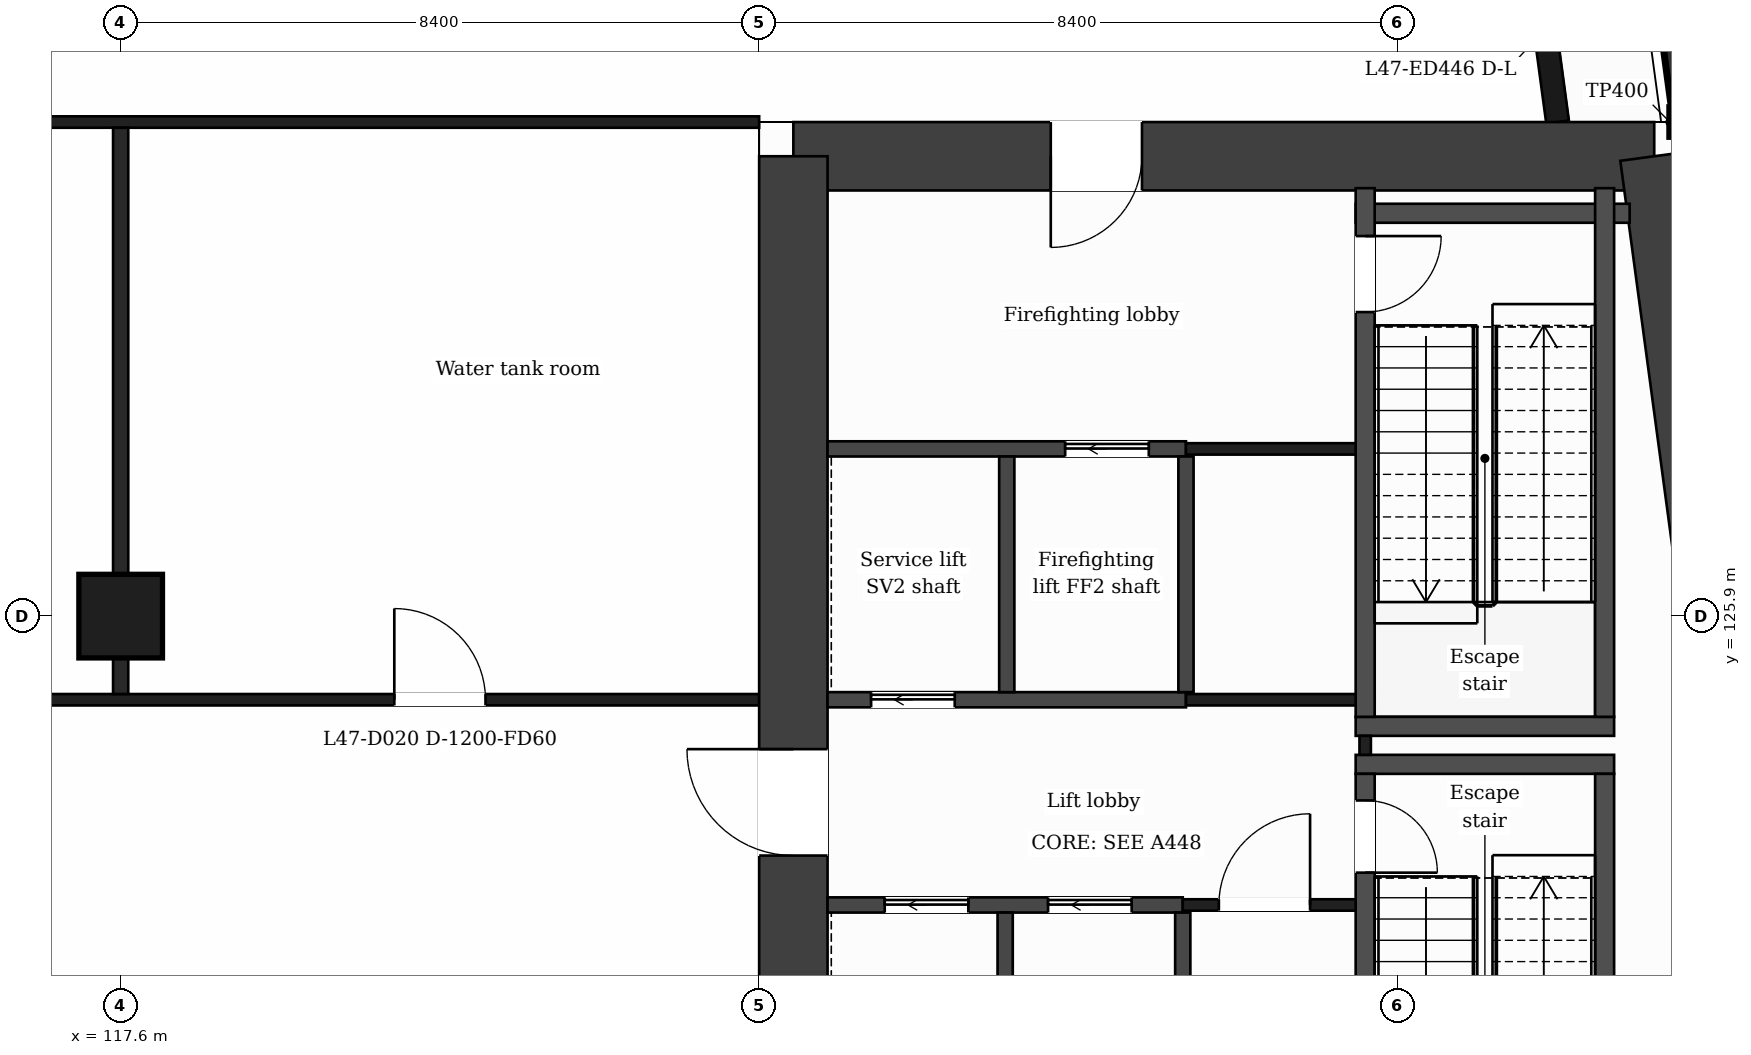
"""IFC4 building model, lengths in metres.
Left out: names, types, materials, properties, quantities, classifications, styles, units other than length and angle.
Written with IfcOpenShell. Run it as: python <this file> out.ifc"""

import sys

from ifc_helpers import new_model, si_unit, direction, frame, frame_2d, origin, origin_2d, place, context, subcontext, project, spatial, rectangle, extrude, element, fill, save


model = new_model("IFC4")
c1 = context("Model", 3, precision=1e-05, world=origin(), true_north=direction((0.0, 1.0)))
c2 = subcontext(c1, "Body", "Model", "MODEL_VIEW")
j1 = project(units=[si_unit("LENGTHUNIT", "METRE"), si_unit("PLANEANGLEUNIT", "RADIAN")], contexts=[c1])
p1 = place(None, origin())
s1 = spatial("IfcSite", under=j1, at=p1, CompositionType="ELEMENT")
p2 = place(p1, origin())
s2 = spatial("IfcBuilding", under=s1, at=p2, CompositionType="ELEMENT")
p3 = place(p2, frame((0.0, 0.0, 197.2)))
s3 = spatial("IfcBuildingStorey", under=s2, at=p3, CompositionType="ELEMENT", Elevation=197.2)
p4 = place(p3, frame((126.45, 131.95, 0.0), z_axis=(0.0, 0.0, 1.0), x_axis=(1.0, 0.0, 0.0)))
e1 = element("IfcWall", 1, at=p4, inside=s3, PredefinedType="SHEAR", context=c2, shape_type="SweptSolid", body=[
    extrude(rectangle(XDim=11.326, YDim=0.9, at=frame_2d((5.663, 0.0))), origin(), (0.0, 0.0, 1.0), 5.0),
])
p5 = place(p4, frame((3.386, 0.0, 0.0)))
e2 = element("IfcOpeningElement", 2, at=p5, cuts=e1, PredefinedType="OPENING", context=c2, shape_type="SweptSolid", body=[
    extrude(rectangle(XDim=1.2, YDim=2.1, at=frame_2d((0.6, 1.05))), frame((0.0, 0.46, 0.0), z_axis=(0.0, -1.0, 0.0), x_axis=(1.0, 0.0, 0.0)), (0.0, 0.0, 1.0), 0.92),
])
p6 = place(p3, frame((137.776, 131.95, 0.0), z_axis=(0.0, 0.0, 1.0), x_axis=(0.133421759112, -0.991059349482, 0.0)))
e3 = element("IfcWall", 3, at=p6, inside=s3, PredefinedType="SHEAR", context=c2, shape_type="SweptSolid", body=[
    extrude(rectangle(XDim=21.29, YDim=0.9, at=frame_2d((10.645, 0.0))), origin(), (0.0, 0.0, 1.0), 5.0),
])
p7 = place(p3, frame((126.45, 110.85, 0.0), z_axis=(0.0, 0.0, 1.0), x_axis=(0.0, 1.0, 0.0)))
e4 = element("IfcWall", 4, at=p7, inside=s3, PredefinedType="SHEAR", context=c2, shape_type="SweptSolid", body=[
    extrude(rectangle(XDim=21.1, YDim=0.9, at=frame_2d((10.55, 0.0))), origin(), (0.0, 0.0, 1.0), 5.0),
])
p8 = place(p7, frame((1.05, 0.0, 0.0)))
e5 = element("IfcOpeningElement", 5, at=p8, cuts=e4, PredefinedType="OPENING", context=c2, shape_type="SweptSolid", body=[
    extrude(rectangle(XDim=1.2, YDim=2.1, at=frame_2d((0.6, 1.05))), frame((0.0, 0.46, 0.0), z_axis=(0.0, -1.0, 0.0), x_axis=(1.0, 0.0, 0.0)), (0.0, 0.0, 1.0), 0.92),
])
p9 = place(p7, frame((11.9, 0.0, 0.0)))
e6 = element("IfcOpeningElement", 6, at=p9, cuts=e4, PredefinedType="OPENING", context=c2, shape_type="SweptSolid", body=[
    extrude(rectangle(XDim=1.4, YDim=2.1, at=frame_2d((0.7, 1.05))), frame((0.0, 0.46, 0.0), z_axis=(0.0, -1.0, 0.0), x_axis=(1.0, 0.0, 0.0)), (0.0, 0.0, 1.0), 0.92),
])
p10 = place(p3, frame((117.6, 125.9, 0.0), z_axis=(0.0, 0.0, 1.0), x_axis=(1.0, 0.0, 0.0)))
e7 = element("IfcColumn", 7, at=p10, inside=s3, PredefinedType="COLUMN", context=c2, shape_type="SweptSolid", body=[
    extrude(rectangle(XDim=1.1, YDim=1.1, at=origin_2d()), origin(), (0.0, 0.0, 1.0), 5.0),
])
p11 = place(p3, frame((136.504, 132.4, 0.0), z_axis=(0.0, 0.0, 1.0), x_axis=(-0.133399697462, 0.99106231929, 0.0)))
e8 = element("IfcWall", 8, at=p11, inside=s3, PredefinedType="SOLIDWALL", context=c2, shape_type="SweptSolid", body=[
    extrude(rectangle(XDim=6.74, YDim=0.3, at=frame_2d((3.37, 0.0))), origin(), (0.0, 0.0, 1.0), 4.68),
])
p12 = place(p11, frame((1.115, 0.0, 0.0)))
e9 = element("IfcOpeningElement", 9, at=p12, cuts=e8, PredefinedType="OPENING", context=c2, shape_type="SweptSolid", body=[
    extrude(rectangle(XDim=1.2, YDim=2.4, at=frame_2d((0.6, 1.2))), frame((0.0, 0.16, 0.0), z_axis=(0.0, -1.0, 0.0), x_axis=(1.0, 0.0, 0.0)), (0.0, 0.0, 1.0), 0.32),
])
p13 = place(p3, frame((126.9, 122.1, 0.0), z_axis=(0.0, 0.0, 1.0), x_axis=(1.0, 0.0, 0.0)))
e10 = element("IfcWall", 10, at=p13, inside=s3, PredefinedType="PARTITIONING", context=c2, shape_type="SweptSolid", body=[
    extrude(rectangle(XDim=4.673, YDim=0.2, at=frame_2d((2.336, 0.0))), origin(), (0.0, 0.0, 1.0), 4.68),
])
p14 = place(p13, frame((2.901, 0.0, 0.0)))
e11 = element("IfcOpeningElement", 11, at=p14, cuts=e10, PredefinedType="OPENING", context=c2, shape_type="SweptSolid", body=[
    extrude(rectangle(XDim=1.1, YDim=2.1, at=frame_2d((0.55, 1.05))), frame((0.0, 0.11, 0.0), z_axis=(0.0, -1.0, 0.0), x_axis=(1.0, 0.0, 0.0)), (0.0, 0.0, 1.0), 0.22),
])
p15 = place(p13, frame((0.752, 0.0, 0.0)))
e12 = element("IfcOpeningElement", 12, at=p15, cuts=e10, PredefinedType="OPENING", context=c2, shape_type="SweptSolid", body=[
    extrude(rectangle(XDim=1.1, YDim=2.1, at=frame_2d((0.55, 1.05))), frame((0.0, 0.11, 0.0), z_axis=(0.0, -1.0, 0.0), x_axis=(1.0, 0.0, 0.0)), (0.0, 0.0, 1.0), 0.22),
])
p16 = place(p3, frame((131.573, 122.1, 0.0), z_axis=(0.0, 0.0, 1.0), x_axis=(1.0, 0.0, 0.0)))
e13 = element("IfcWall", 13, at=p16, inside=s3, PredefinedType="PARTITIONING", context=c2, shape_type="SweptSolid", body=[
    extrude(rectangle(XDim=2.4, YDim=0.15, at=frame_2d((1.2, 0.0))), origin(), (0.0, 0.0, 1.0), 4.68),
])
p17 = place(p16, frame((0.475, 0.0, 0.0)))
e14 = element("IfcOpeningElement", 14, at=p17, cuts=e13, PredefinedType="OPENING", context=c2, shape_type="SweptSolid", body=[
    extrude(rectangle(XDim=1.2, YDim=2.1, at=frame_2d((0.6, 1.05))), frame((0.0, 0.085, 0.0), z_axis=(0.0, -1.0, 0.0), x_axis=(1.0, 0.0, 0.0)), (0.0, 0.0, 1.0), 0.17),
])
for number, where, z_axis, x_axis in (
    (15, (133.848, 123.95, 0.0), (0.0, 0.0, 1.0), (1.0, 0.0, 0.0)),
    (16, (133.848, 124.45, 0.0), (0.0, 0.0, 1.0), (1.0, 0.0, 0.0)),
):
    element("IfcWall", number, at=place(p3, frame(where, z_axis=z_axis, x_axis=x_axis)), inside=s3, PredefinedType="PARTITIONING", context=c2, shape_type="SweptSolid", body=[
        extrude(rectangle(XDim=3.4, YDim=0.25, at=frame_2d((1.7, 0.0))), origin(), (0.0, 0.0, 1.0), 4.68),
    ])
p18 = place(p3, frame((126.9, 124.8, 0.0), z_axis=(0.0, 0.0, 1.0), x_axis=(1.0, 0.0, 0.0)))
e17 = element("IfcWall", 17, at=p18, inside=s3, PredefinedType="PARTITIONING", context=c2, shape_type="SweptSolid", body=[
    extrude(rectangle(XDim=4.715, YDim=0.2, at=frame_2d((2.358, 0.0))), origin(), (0.0, 0.0, 1.0), 4.68),
])
p19 = place(p18, frame((0.573, 0.0, 0.0)))
e18 = element("IfcOpeningElement", 18, at=p19, cuts=e17, PredefinedType="OPENING", context=c2, shape_type="SweptSolid", body=[
    extrude(rectangle(XDim=1.1, YDim=2.1, at=frame_2d((0.55, 1.05))), frame((0.0, 0.11, 0.0), z_axis=(0.0, -1.0, 0.0), x_axis=(1.0, 0.0, 0.0)), (0.0, 0.0, 1.0), 0.22),
])
p20 = place(p3, frame((131.615, 124.8, 0.0), z_axis=(0.0, 0.0, 1.0), x_axis=(1.0, 0.0, 0.0)))
e19 = element("IfcWall", 19, at=p20, inside=s3, PredefinedType="PARTITIONING", context=c2, shape_type="SweptSolid", body=[
    extrude(rectangle(XDim=2.483, YDim=0.15, at=frame_2d((1.241, 0.0))), origin(), (0.0, 0.0, 1.0), 4.68),
])
p21 = place(p3, frame((100.8, 124.8, 0.0), z_axis=(0.0, 0.0, 1.0), x_axis=(1.0, 0.0, 0.0)))
e20 = element("IfcWall", 20, at=p21, inside=s3, PredefinedType="PARTITIONING", context=c2, shape_type="SweptSolid", body=[
    extrude(rectangle(XDim=25.2, YDim=0.15, at=frame_2d((12.6, 0.0))), origin(), (0.0, 0.0, 1.0), 4.68),
])
p22 = place(p21, frame((3.6, 0.0, 0.0)))
e21 = element("IfcOpeningElement", 21, at=p22, cuts=e20, PredefinedType="OPENING", context=c2, shape_type="SweptSolid", body=[
    extrude(rectangle(XDim=1.2, YDim=2.1, at=frame_2d((0.6, 1.05))), frame((0.0, 0.085, 0.0), z_axis=(0.0, -1.0, 0.0), x_axis=(1.0, 0.0, 0.0)), (0.0, 0.0, 1.0), 0.17),
])
p23 = place(p21, frame((12.0, 0.0, 0.0)))
e22 = element("IfcOpeningElement", 22, at=p23, cuts=e20, PredefinedType="OPENING", context=c2, shape_type="SweptSolid", body=[
    extrude(rectangle(XDim=1.2, YDim=2.1, at=frame_2d((0.6, 1.05))), frame((0.0, 0.085, 0.0), z_axis=(0.0, -1.0, 0.0), x_axis=(1.0, 0.0, 0.0)), (0.0, 0.0, 1.0), 0.17),
])
p24 = place(p21, frame((20.4, 0.0, 0.0)))
e23 = element("IfcOpeningElement", 23, at=p24, cuts=e20, PredefinedType="OPENING", context=c2, shape_type="SweptSolid", body=[
    extrude(rectangle(XDim=1.2, YDim=2.1, at=frame_2d((0.6, 1.05))), frame((0.0, 0.085, 0.0), z_axis=(0.0, -1.0, 0.0), x_axis=(1.0, 0.0, 0.0)), (0.0, 0.0, 1.0), 0.17),
])
p25 = place(p3, frame((126.9, 128.1, 0.0), z_axis=(0.0, 0.0, 1.0), x_axis=(1.0, 0.0, 0.0)))
e24 = element("IfcWall", 24, at=p25, inside=s3, PredefinedType="PARTITIONING", context=c2, shape_type="SweptSolid", body=[
    extrude(rectangle(XDim=4.715, YDim=0.2, at=frame_2d((2.358, 0.0))), origin(), (0.0, 0.0, 1.0), 4.68),
])
p26 = place(p25, frame((3.126, 0.0, 0.0)))
e25 = element("IfcOpeningElement", 25, at=p26, cuts=e24, PredefinedType="OPENING", context=c2, shape_type="SweptSolid", body=[
    extrude(rectangle(XDim=1.1, YDim=2.1, at=frame_2d((0.55, 1.05))), frame((0.0, 0.11, 0.0), z_axis=(0.0, -1.0, 0.0), x_axis=(1.0, 0.0, 0.0)), (0.0, 0.0, 1.0), 0.22),
])
p27 = place(p3, frame((131.615, 128.1, 0.0), z_axis=(0.0, 0.0, 1.0), x_axis=(1.0, 0.0, 0.0)))
e26 = element("IfcWall", 26, at=p27, inside=s3, PredefinedType="PARTITIONING", context=c2, shape_type="SweptSolid", body=[
    extrude(rectangle(XDim=2.358, YDim=0.15, at=frame_2d((1.179, 0.0))), origin(), (0.0, 0.0, 1.0), 4.68),
])
p28 = place(p3, frame((133.848, 131.2, 0.0), z_axis=(0.0, 0.0, 1.0), x_axis=(1.0, 0.0, 0.0)))
e27 = element("IfcWall", 27, at=p28, inside=s3, PredefinedType="PARTITIONING", context=c2, shape_type="SweptSolid", body=[
    extrude(rectangle(XDim=3.605, YDim=0.25, at=frame_2d((1.802, 0.0))), origin(), (0.0, 0.0, 1.0), 4.68),
])
p29 = place(p3, frame((100.8, 132.4, 0.0), z_axis=(0.0, 0.0, 1.0), x_axis=(1.0, 0.0, 0.0)))
e28 = element("IfcWall", 28, at=p29, inside=s3, PredefinedType="PARTITIONING", context=c2, shape_type="SweptSolid", body=[
    extrude(rectangle(XDim=25.2, YDim=0.15, at=frame_2d((12.6, 0.0))), origin(), (0.0, 0.0, 1.0), 4.68),
])
p30 = place(p3, frame((117.6, 124.875, 0.0), z_axis=(0.0, 0.0, 1.0), x_axis=(0.0, 1.0, 0.0)))
e29 = element("IfcWall", 29, at=p30, inside=s3, PredefinedType="PARTITIONING", context=c2, shape_type="SweptSolid", body=[
    extrude(rectangle(XDim=7.45, YDim=0.2, at=frame_2d((3.725, 0.0))), origin(), (0.0, 0.0, 1.0), 4.68),
])
for number, where, z_axis, x_axis in (
    (30, (129.237, 118.9, 0.0), (0.0, 0.0, 1.0), (0.0, 1.0, 0.0)),
    (31, (129.258, 124.9, 0.0), (0.0, 0.0, 1.0), (0.0, 1.0, 0.0)),
):
    element("IfcWall", number, at=place(p3, frame(where, z_axis=z_axis, x_axis=x_axis)), inside=s3, PredefinedType="PARTITIONING", context=c2, shape_type="SweptSolid", body=[
        extrude(rectangle(XDim=3.1, YDim=0.2, at=frame_2d((1.55, 0.0))), origin(), (0.0, 0.0, 1.0), 4.68),
    ])
p31 = place(p3, frame((131.573, 116.87, 0.0), z_axis=(0.0, 0.0, 1.0), x_axis=(0.0, 1.0, 0.0)))
e32 = element("IfcWall", 32, at=p31, inside=s3, PredefinedType="PARTITIONING", context=c2, shape_type="SweptSolid", body=[
    extrude(rectangle(XDim=5.13, YDim=0.2, at=frame_2d((2.565, 0.0))), origin(), (0.0, 0.0, 1.0), 4.68),
])
p32 = place(p31, frame((0.68, 0.0, 0.0)))
e33 = element("IfcOpeningElement", 33, at=p32, cuts=e32, PredefinedType="OPENING", context=c2, shape_type="SweptSolid", body=[
    extrude(rectangle(XDim=0.9, YDim=2.1, at=frame_2d((0.45, 1.05))), frame((0.0, 0.11, 0.0), z_axis=(0.0, -1.0, 0.0), x_axis=(1.0, 0.0, 0.0)), (0.0, 0.0, 1.0), 0.22),
])
p33 = place(p3, frame((131.615, 124.9, 0.0), z_axis=(0.0, 0.0, 1.0), x_axis=(0.0, 1.0, 0.0)))
e34 = element("IfcWall", 34, at=p33, inside=s3, PredefinedType="PARTITIONING", context=c2, shape_type="SweptSolid", body=[
    extrude(rectangle(XDim=3.1, YDim=0.2, at=frame_2d((1.55, 0.0))), origin(), (0.0, 0.0, 1.0), 4.68),
])
p34 = place(p3, frame((133.973, 124.075, 0.0), z_axis=(0.0, 0.0, 1.0), x_axis=(0.0, 1.0, 0.0)))
e35 = element("IfcWall", 35, at=p34, inside=s3, PredefinedType="PARTITIONING", context=c2, shape_type="SweptSolid", body=[
    extrude(rectangle(XDim=0.25, YDim=0.15, at=frame_2d((0.125, 0.0))), origin(), (0.0, 0.0, 1.0), 4.68),
])
p35 = place(p3, frame((133.973, 116.87, 0.0), z_axis=(0.0, 0.0, 1.0), x_axis=(0.0, 1.0, 0.0)))
e36 = element("IfcWall", 36, at=p35, inside=s3, PredefinedType="PARTITIONING", context=c2, shape_type="SweptSolid", body=[
    extrude(rectangle(XDim=6.955, YDim=0.25, at=frame_2d((3.478, 0.0))), origin(), (0.0, 0.0, 1.0), 4.68),
])
p36 = place(p35, frame((5.655, 0.0, 0.0)))
e37 = element("IfcOpeningElement", 37, at=p36, cuts=e36, PredefinedType="OPENING", context=c2, shape_type="SweptSolid", body=[
    extrude(rectangle(XDim=0.95, YDim=2.1, at=frame_2d((0.475, 1.05))), frame((0.0, 0.135, 0.0), z_axis=(0.0, -1.0, 0.0), x_axis=(1.0, 0.0, 0.0)), (0.0, 0.0, 1.0), 0.27),
])
p37 = place(p3, frame((133.973, 124.575, 0.0), z_axis=(0.0, 0.0, 1.0), x_axis=(0.0, 1.0, 0.0)))
e38 = element("IfcWall", 38, at=p37, inside=s3, PredefinedType="PARTITIONING", context=c2, shape_type="SweptSolid", body=[
    extrude(rectangle(XDim=6.955, YDim=0.25, at=frame_2d((3.478, 0.0))), origin(), (0.0, 0.0, 1.0), 4.68),
])
p38 = place(p37, frame((5.325, 0.0, 0.0)))
e39 = element("IfcOpeningElement", 39, at=p38, cuts=e38, PredefinedType="OPENING", context=c2, shape_type="SweptSolid", body=[
    extrude(rectangle(XDim=1.0, YDim=2.1, at=frame_2d((0.5, 1.05))), frame((0.0, 0.135, 0.0), z_axis=(0.0, -1.0, 0.0), x_axis=(1.0, 0.0, 0.0)), (0.0, 0.0, 1.0), 0.27),
])
p39 = place(p3, frame((137.123, 116.87, 0.0), z_axis=(0.0, 0.0, 1.0), x_axis=(0.0, 1.0, 0.0)))
e40 = element("IfcWall", 40, at=p39, inside=s3, PredefinedType="PARTITIONING", context=c2, shape_type="SweptSolid", body=[
    extrude(rectangle(XDim=6.955, YDim=0.25, at=frame_2d((3.478, 0.0))), origin(), (0.0, 0.0, 1.0), 4.68),
])
p40 = place(p3, frame((137.123, 124.575, 0.0), z_axis=(0.0, 0.0, 1.0), x_axis=(0.0, 1.0, 0.0)))
e41 = element("IfcWall", 41, at=p40, inside=s3, PredefinedType="PARTITIONING", context=c2, shape_type="SweptSolid", body=[
    extrude(rectangle(XDim=6.955, YDim=0.25, at=frame_2d((3.478, 0.0))), origin(), (0.0, 0.0, 1.0), 4.68),
])
p41 = place(p24, origin())
e42 = element("IfcDoor", 42, at=p41, inside=s3, OperationType="SINGLE_SWING_LEFT", PredefinedType="DOOR", context=c2, shape_type="SweptSolid", body=[
    extrude(rectangle(XDim=1.2, YDim=2.1, at=frame_2d((0.6, 1.05))), frame((0.0, 0.025, 0.0), z_axis=(0.0, -1.0, 0.0), x_axis=(1.0, 0.0, 0.0)), (0.0, 0.0, 1.0), 0.05),
])
fill(e23, e42)
p42 = place(p17, origin())
e43 = element("IfcDoor", 43, at=p42, inside=s3, OperationType="SINGLE_SWING_RIGHT", PredefinedType="DOOR", context=c2, shape_type="SweptSolid", body=[
    extrude(rectangle(XDim=1.2, YDim=2.1, at=frame_2d((0.6, 1.05))), frame((0.0, 0.025, 0.0), z_axis=(0.0, -1.0, 0.0), x_axis=(1.0, 0.0, 0.0)), (0.0, 0.0, 1.0), 0.05),
])
fill(e14, e43)
p43 = place(p14, origin())
e44 = element("IfcDoor", 44, at=p43, inside=s3, OperationType="SLIDING_TO_LEFT", PredefinedType="DOOR", context=c2, shape_type="SweptSolid", body=[
    extrude(rectangle(XDim=1.1, YDim=2.1, at=frame_2d((0.55, 1.05))), frame((0.0, 0.025, 0.0), z_axis=(0.0, -1.0, 0.0), x_axis=(1.0, 0.0, 0.0)), (0.0, 0.0, 1.0), 0.05),
])
fill(e11, e44)
p44 = place(p15, origin())
e45 = element("IfcDoor", 45, at=p44, inside=s3, OperationType="SLIDING_TO_LEFT", PredefinedType="DOOR", context=c2, shape_type="SweptSolid", body=[
    extrude(rectangle(XDim=1.1, YDim=2.1, at=frame_2d((0.55, 1.05))), frame((0.0, 0.025, 0.0), z_axis=(0.0, -1.0, 0.0), x_axis=(1.0, 0.0, 0.0)), (0.0, 0.0, 1.0), 0.05),
])
fill(e12, e45)
p45 = place(p26, origin())
e46 = element("IfcDoor", 46, at=p45, inside=s3, OperationType="SLIDING_TO_LEFT", PredefinedType="DOOR", context=c2, shape_type="SweptSolid", body=[
    extrude(rectangle(XDim=1.1, YDim=2.1, at=frame_2d((0.55, 1.05))), frame((0.0, 0.025, 0.0), z_axis=(0.0, -1.0, 0.0), x_axis=(1.0, 0.0, 0.0)), (0.0, 0.0, 1.0), 0.05),
])
fill(e25, e46)
p46 = place(p19, origin())
e47 = element("IfcDoor", 47, at=p46, inside=s3, OperationType="SLIDING_TO_LEFT", PredefinedType="DOOR", context=c2, shape_type="SweptSolid", body=[
    extrude(rectangle(XDim=1.1, YDim=2.1, at=frame_2d((0.55, 1.05))), frame((0.0, 0.025, 0.0), z_axis=(0.0, -1.0, 0.0), x_axis=(1.0, 0.0, 0.0)), (0.0, 0.0, 1.0), 0.05),
])
fill(e18, e47)
p47 = place(p36, origin())
e48 = element("IfcDoor", 48, at=p47, inside=s3, OperationType="SINGLE_SWING_LEFT", PredefinedType="DOOR", context=c2, shape_type="SweptSolid", body=[
    extrude(rectangle(XDim=0.95, YDim=2.1, at=frame_2d((0.475, 1.05))), frame((0.0, 0.025, 0.0), z_axis=(0.0, -1.0, 0.0), x_axis=(1.0, 0.0, 0.0)), (0.0, 0.0, 1.0), 0.05),
])
fill(e37, e48)
p48 = place(p38, origin())
e49 = element("IfcDoor", 49, at=p48, inside=s3, OperationType="SINGLE_SWING_RIGHT", PredefinedType="DOOR", context=c2, shape_type="SweptSolid", body=[
    extrude(rectangle(XDim=1.0, YDim=2.1, at=frame_2d((0.5, 1.05))), frame((0.0, 0.025, 0.0), z_axis=(0.0, -1.0, 0.0), x_axis=(1.0, 0.0, 0.0)), (0.0, 0.0, 1.0), 0.05),
])
fill(e39, e49)
p49 = place(p5, origin())
e50 = element("IfcDoor", 50, at=p49, inside=s3, OperationType="SINGLE_SWING_LEFT", PredefinedType="DOOR", context=c2, shape_type="SweptSolid", body=[
    extrude(rectangle(XDim=1.2, YDim=2.1, at=frame_2d((0.6, 1.05))), frame((0.0, 0.025, 0.0), z_axis=(0.0, -1.0, 0.0), x_axis=(1.0, 0.0, 0.0)), (0.0, 0.0, 1.0), 0.05),
])
fill(e2, e50)
p50 = place(p9, origin())
e51 = element("IfcDoor", 51, at=p50, inside=s3, OperationType="SINGLE_SWING_RIGHT", PredefinedType="DOOR", context=c2, shape_type="SweptSolid", body=[
    extrude(rectangle(XDim=1.4, YDim=2.1, at=frame_2d((0.7, 1.05))), frame((0.0, 0.025, 0.0), z_axis=(0.0, -1.0, 0.0), x_axis=(1.0, 0.0, 0.0)), (0.0, 0.0, 1.0), 0.05),
])
fill(e6, e51)
save(model, sys.argv[1])
